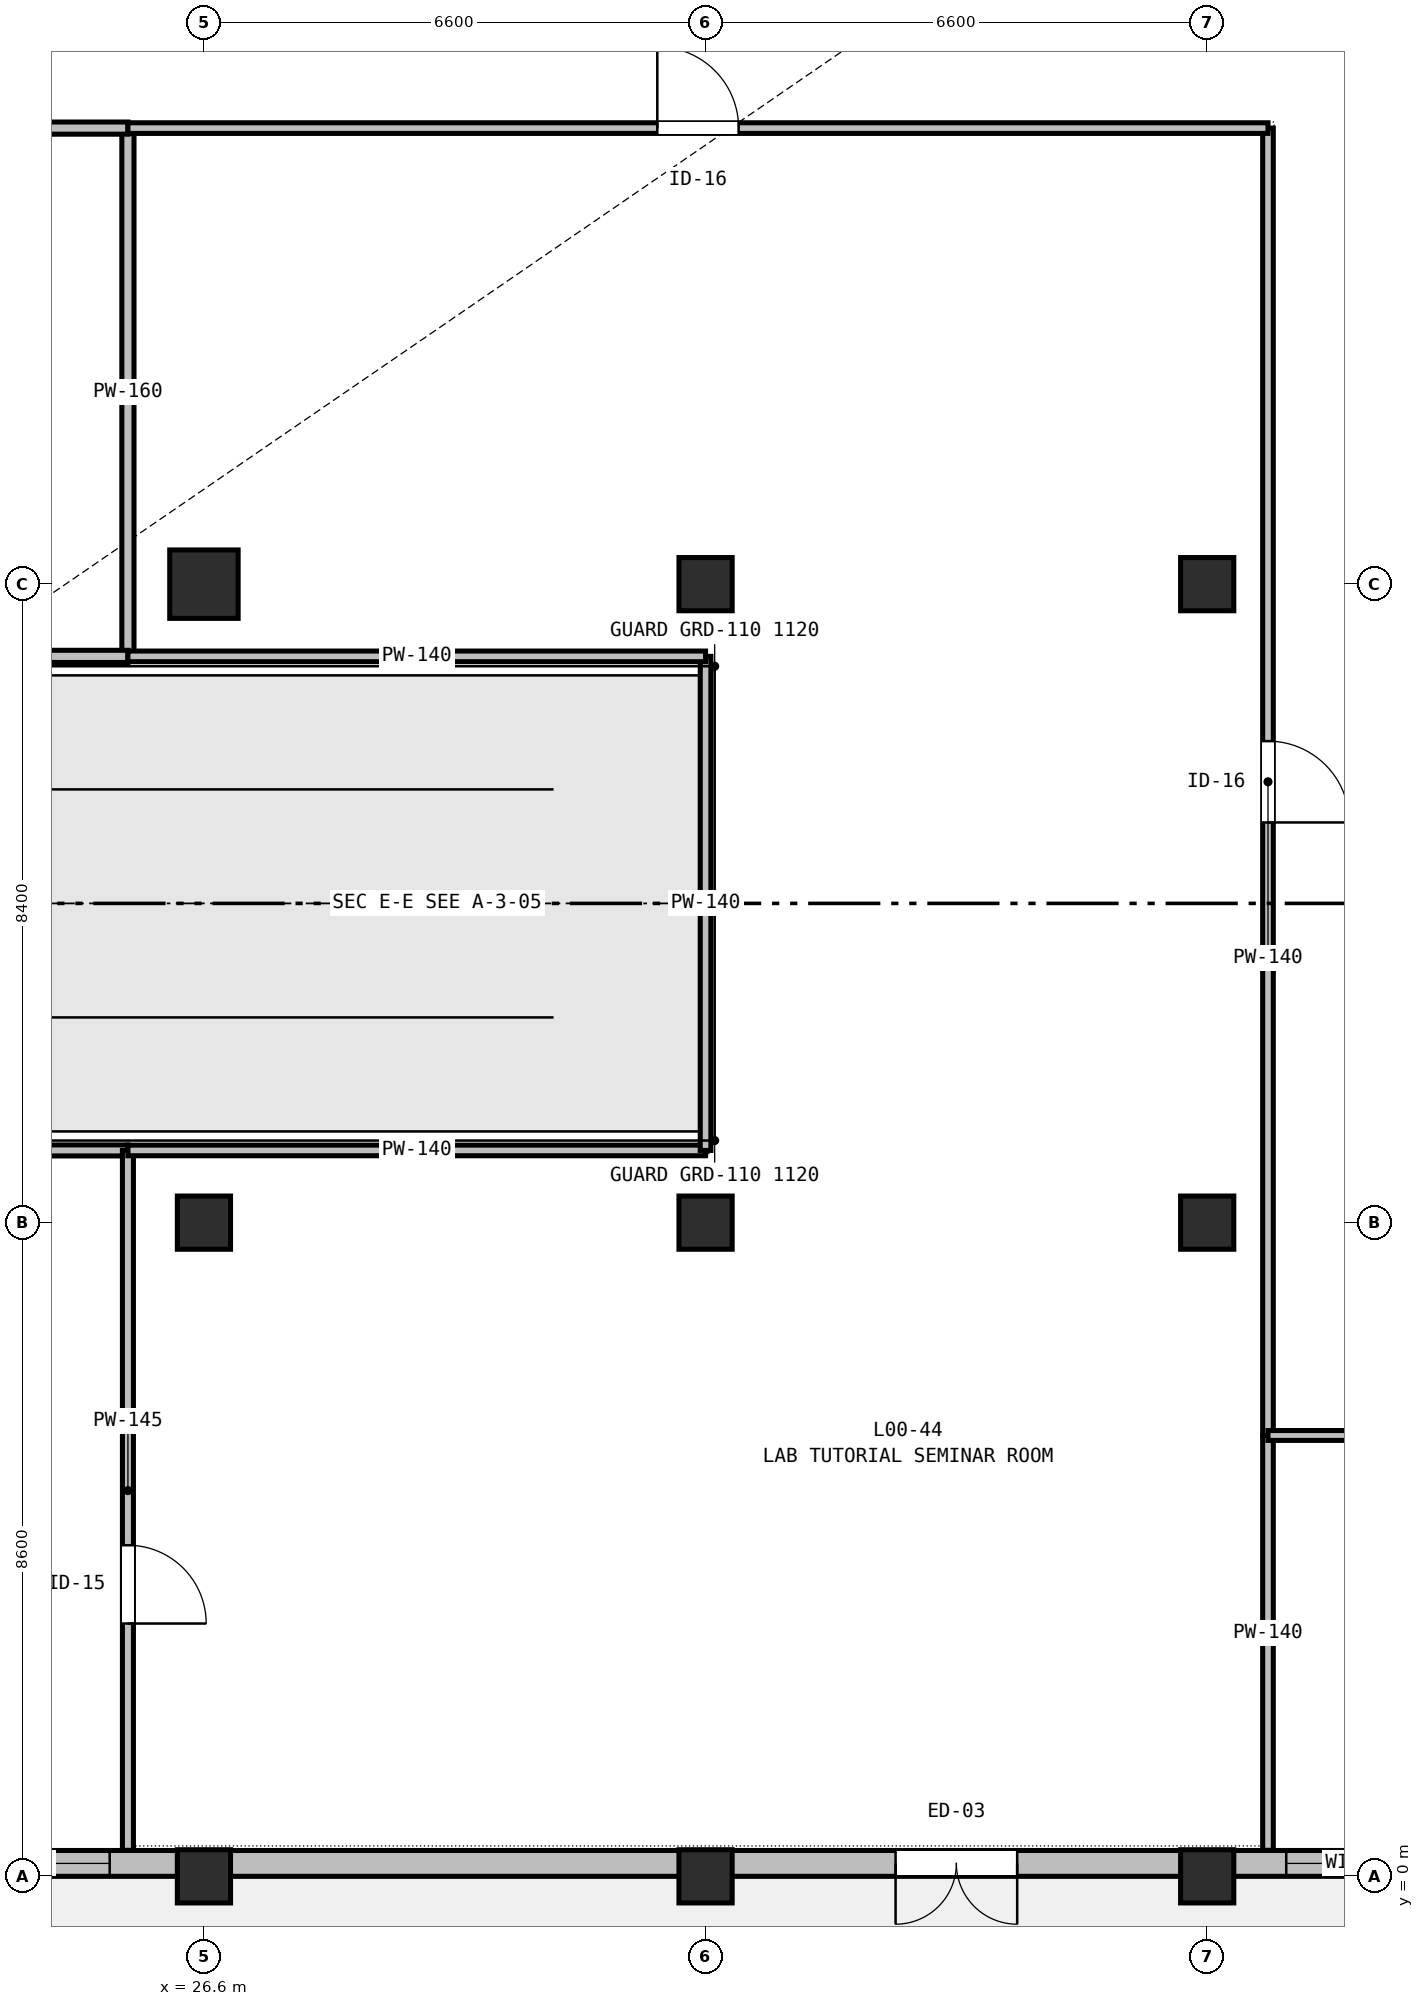
"""IFC4 building model, lengths in metres.
Left out: names, types, materials, properties, quantities, classifications, styles, units other than length and angle.
Written with IfcOpenShell. Run it as: python <this file> out.ifc"""

import sys

from ifc_helpers import new_model, si_unit, direction, frame, frame_2d, origin, origin_2d, place, context, subcontext, project, spatial, rectangle, extrude, element, fill, save


model = new_model("IFC4")
c1 = context("Model", 3, precision=1e-05, world=origin(), true_north=direction((0.0, 1.0)))
c2 = subcontext(c1, "Body", "Model", "MODEL_VIEW")
j1 = project(units=[si_unit("LENGTHUNIT", "METRE"), si_unit("PLANEANGLEUNIT", "RADIAN")], contexts=[c1])
p1 = place(None, origin())
s1 = spatial("IfcSite", under=j1, at=p1, CompositionType="ELEMENT")
p2 = place(p1, origin())
s2 = spatial("IfcBuilding", under=s1, at=p2, CompositionType="ELEMENT")
p3 = place(p2, origin())
s3 = spatial("IfcBuildingStorey", under=s2, at=p3, CompositionType="ELEMENT", Elevation=0.0)
p4 = place(p3, frame((26.6, 0.0, -0.32), z_axis=(0.0, 0.0, 1.0), x_axis=(1.0, 0.0, 0.0)))
e1 = element("IfcColumn", 1, at=p4, inside=s3, PredefinedType="COLUMN", context=c2, shape_type="SweptSolid", body=[
    extrude(rectangle(XDim=0.7, YDim=0.7, at=origin_2d()), origin(), (0.0, 0.0, 1.0), 5.66),
])
p5 = place(p3, frame((26.6, 8.6, -0.32), z_axis=(0.0, 0.0, 1.0), x_axis=(1.0, 0.0, 0.0)))
e2 = element("IfcColumn", 2, at=p5, inside=s3, PredefinedType="COLUMN", context=c2, shape_type="SweptSolid", body=[
    extrude(rectangle(XDim=0.7, YDim=0.7, at=origin_2d()), origin(), (0.0, 0.0, 1.0), 5.72),
])
p6 = place(p3, frame((26.6, 17.0, -0.32), z_axis=(0.0, 0.0, 1.0), x_axis=(1.0, 0.0, 0.0)))
e3 = element("IfcColumn", 3, at=p6, inside=s3, PredefinedType="COLUMN", context=c2, shape_type="SweptSolid", body=[
    extrude(rectangle(XDim=0.9, YDim=0.9, at=origin_2d()), origin(), (0.0, 0.0, 1.0), 5.72),
])
p7 = place(p3, frame((33.2, 0.0, -0.32), z_axis=(0.0, 0.0, 1.0), x_axis=(1.0, 0.0, 0.0)))
e4 = element("IfcColumn", 4, at=p7, inside=s3, PredefinedType="COLUMN", context=c2, shape_type="SweptSolid", body=[
    extrude(rectangle(XDim=0.7, YDim=0.7, at=origin_2d()), origin(), (0.0, 0.0, 1.0), 5.66),
])
for number, where, z_axis, x_axis in (
    (5, (33.2, 8.6, 0.0), (0.0, 0.0, 1.0), (1.0, 0.0, 0.0)),
    (6, (33.2, 17.0, 0.0), (0.0, 0.0, 1.0), (1.0, 0.0, 0.0)),
):
    element("IfcColumn", number, at=place(p3, frame(where, z_axis=z_axis, x_axis=x_axis)), inside=s3, PredefinedType="COLUMN", context=c2, shape_type="SweptSolid", body=[
        extrude(rectangle(XDim=0.7, YDim=0.7, at=origin_2d()), origin(), (0.0, 0.0, 1.0), 5.4),
    ])
p8 = place(p3, frame((39.8, 0.0, -0.32), z_axis=(0.0, 0.0, 1.0), x_axis=(1.0, 0.0, 0.0)))
e7 = element("IfcColumn", 7, at=p8, inside=s3, PredefinedType="COLUMN", context=c2, shape_type="SweptSolid", body=[
    extrude(rectangle(XDim=0.7, YDim=0.7, at=origin_2d()), origin(), (0.0, 0.0, 1.0), 5.66),
])
for number, where, z_axis, x_axis in (
    (8, (39.8, 8.6, 0.0), (0.0, 0.0, 1.0), (1.0, 0.0, 0.0)),
    (9, (39.8, 17.0, 0.0), (0.0, 0.0, 1.0), (1.0, 0.0, 0.0)),
):
    element("IfcColumn", number, at=place(p3, frame(where, z_axis=z_axis, x_axis=x_axis)), inside=s3, PredefinedType="COLUMN", context=c2, shape_type="SweptSolid", body=[
        extrude(rectangle(XDim=0.7, YDim=0.7, at=origin_2d()), origin(), (0.0, 0.0, 1.0), 5.4),
    ])
p9 = place(p3, frame((46.4, 0.17, 0.0), z_axis=(0.0, 0.0, 1.0), x_axis=(-1.0, 0.0, 0.0)))
e10 = element("IfcWall", 10, at=p9, inside=s3, PredefinedType="STANDARD", context=c2, shape_type="SweptSolid", body=[
    extrude(rectangle(XDim=6.6, YDim=0.34, at=frame_2d((3.3, 0.0))), origin(), (0.0, 0.0, 1.0), 4.535),
])
p10 = place(p9, frame((0.807, 0.0, 0.9)))
e11 = element("IfcOpeningElement", 11, at=p10, cuts=e10, PredefinedType="OPENING", context=c2, shape_type="SweptSolid", body=[
    extrude(rectangle(XDim=1.95, YDim=2.1, at=frame_2d((0.975, 1.05))), frame((0.0, 0.18, 0.0), z_axis=(0.0, -1.0, 0.0), x_axis=(1.0, 0.0, 0.0)), (0.0, 0.0, 1.0), 0.36),
])
p11 = place(p9, frame((3.61, 0.0, 0.9)))
e12 = element("IfcOpeningElement", 12, at=p11, cuts=e10, PredefinedType="OPENING", context=c2, shape_type="SweptSolid", body=[
    extrude(rectangle(XDim=1.95, YDim=2.1, at=frame_2d((0.975, 1.05))), frame((0.0, 0.18, 0.0), z_axis=(0.0, -1.0, 0.0), x_axis=(1.0, 0.0, 0.0)), (0.0, 0.0, 1.0), 0.36),
])
p12 = place(p3, frame((39.8, 0.17, 0.0), z_axis=(0.0, 0.0, 1.0), x_axis=(-1.0, 0.0, 0.0)))
e13 = element("IfcWall", 13, at=p12, inside=s3, PredefinedType="STANDARD", context=c2, shape_type="SweptSolid", body=[
    extrude(rectangle(XDim=6.6, YDim=0.34, at=frame_2d((3.3, 0.0))), origin(), (0.0, 0.0, 1.0), 4.535),
])
p13 = place(p12, frame((2.5, 0.0, 0.0)))
e14 = element("IfcOpeningElement", 14, at=p13, cuts=e13, PredefinedType="OPENING", context=c2, shape_type="SweptSolid", body=[
    extrude(rectangle(XDim=1.6, YDim=2.2, at=frame_2d((0.8, 1.1))), frame((0.0, 0.18, 0.0), z_axis=(0.0, -1.0, 0.0), x_axis=(1.0, 0.0, 0.0)), (0.0, 0.0, 1.0), 0.36),
])
p14 = place(p3, frame((33.2, 0.17, 0.0), z_axis=(0.0, 0.0, 1.0), x_axis=(-1.0, 0.0, 0.0)))
e15 = element("IfcWall", 15, at=p14, inside=s3, PredefinedType="STANDARD", context=c2, shape_type="SweptSolid", body=[
    extrude(rectangle(XDim=6.6, YDim=0.34, at=frame_2d((3.3, 0.0))), origin(), (0.0, 0.0, 1.0), 4.535),
])
p15 = place(p3, frame((26.6, 0.17, 0.0), z_axis=(0.0, 0.0, 1.0), x_axis=(-1.0, 0.0, 0.0)))
e16 = element("IfcWall", 16, at=p15, inside=s3, PredefinedType="STANDARD", context=c2, shape_type="SweptSolid", body=[
    extrude(rectangle(XDim=6.6, YDim=0.34, at=frame_2d((3.3, 0.0))), origin(), (0.0, 0.0, 1.0), 4.535),
])
p16 = place(p15, frame((1.24, 0.0, 0.9)))
e17 = element("IfcOpeningElement", 17, at=p16, cuts=e16, PredefinedType="OPENING", context=c2, shape_type="SweptSolid", body=[
    extrude(rectangle(XDim=2.4, YDim=2.1, at=frame_2d((1.2, 1.05))), frame((0.0, 0.18, 0.0), z_axis=(0.0, -1.0, 0.0), x_axis=(1.0, 0.0, 0.0)), (0.0, 0.0, 1.0), 0.36),
])
p17 = place(p3, frame((25.6, 23.0, 0.0), z_axis=(0.0, 0.0, 1.0), x_axis=(0.0, -1.0, 0.0)))
e18 = element("IfcWall", 18, at=p17, inside=s3, PredefinedType="PARTITIONING", context=c2, shape_type="SweptSolid", body=[
    extrude(rectangle(XDim=6.95, YDim=0.16, at=frame_2d((3.475, 0.0))), origin(), (0.0, 0.0, 1.0), 4.435),
])
p18 = place(p3, frame((25.6, 16.05, 0.0), z_axis=(0.0, 0.0, 1.0), x_axis=(-1.0, 0.0, 0.0)))
e19 = element("IfcWall", 19, at=p18, inside=s3, PredefinedType="PARTITIONING", context=c2, shape_type="SweptSolid", body=[
    extrude(rectangle(XDim=12.0, YDim=0.16, at=frame_2d((6.0, 0.0))), origin(), (0.0, 0.0, 1.0), 4.535),
])
p19 = place(p3, frame((13.6, 23.0, 0.0), z_axis=(0.0, 0.0, 1.0), x_axis=(1.0, 0.0, 0.0)))
e20 = element("IfcWall", 20, at=p19, inside=s3, PredefinedType="PARTITIONING", context=c2, shape_type="SweptSolid", body=[
    extrude(rectangle(XDim=12.0, YDim=0.16, at=frame_2d((6.0, 0.0))), origin(), (0.0, 0.0, 1.0), 4.535),
])
p20 = place(p19, frame((5.515, 0.0, 0.0)))
e21 = element("IfcOpeningElement", 21, at=p20, cuts=e20, PredefinedType="OPENING", context=c2, shape_type="SweptSolid", body=[
    extrude(rectangle(XDim=0.97, YDim=2.1, at=frame_2d((0.485, 1.05))), frame((0.0, 0.09, 0.0), z_axis=(0.0, -1.0, 0.0), x_axis=(1.0, 0.0, 0.0)), (0.0, 0.0, 1.0), 0.18),
])
p21 = place(p3, frame((13.6, 9.55, 0.0), z_axis=(0.0, 0.0, 1.0), x_axis=(1.0, 0.0, 0.0)))
e22 = element("IfcWall", 22, at=p21, inside=s3, PredefinedType="PARTITIONING", context=c2, shape_type="SweptSolid", body=[
    extrude(rectangle(XDim=12.0, YDim=0.145, at=frame_2d((6.0, 0.0))), origin(), (0.0, 0.0, 1.0), 4.535),
])
p22 = place(p3, frame((25.6, 9.55, 0.0), z_axis=(0.0, 0.0, 1.0), x_axis=(0.0, -1.0, 0.0)))
e23 = element("IfcWall", 23, at=p22, inside=s3, PredefinedType="PARTITIONING", context=c2, shape_type="SweptSolid", body=[
    extrude(rectangle(XDim=9.208, YDim=0.145, at=frame_2d((4.604, 0.0))), origin(), (0.0, 0.0, 1.0), 4.735),
])
p23 = place(p22, frame((5.194, 0.0, 0.0)))
e24 = element("IfcOpeningElement", 24, at=p23, cuts=e23, PredefinedType="OPENING", context=c2, shape_type="SweptSolid", body=[
    extrude(rectangle(XDim=1.03, YDim=2.1, at=frame_2d((0.515, 1.05))), frame((0.0, 0.083, 0.0), z_axis=(0.0, -1.0, 0.0), x_axis=(1.0, 0.0, 0.0)), (0.0, 0.0, 1.0), 0.165),
])
p24 = place(p3, frame((40.6, 23.0, 0.0), z_axis=(0.0, 0.0, 1.0), x_axis=(0.0, -1.0, 0.0)))
e25 = element("IfcWall", 25, at=p24, inside=s3, PredefinedType="PARTITIONING", context=c2, shape_type="SweptSolid", body=[
    extrude(rectangle(XDim=17.2, YDim=0.14, at=frame_2d((8.6, 0.0))), origin(), (0.0, 0.0, 1.0), 4.735),
])
p25 = place(p24, frame((8.065, 0.0, 0.0)))
e26 = element("IfcOpeningElement", 26, at=p25, cuts=e25, PredefinedType="OPENING", context=c2, shape_type="SweptSolid", body=[
    extrude(rectangle(XDim=1.07, YDim=2.1, at=frame_2d((0.535, 1.05))), frame((0.0, 0.08, 0.0), z_axis=(0.0, -1.0, 0.0), x_axis=(1.0, 0.0, 0.0)), (0.0, 0.0, 1.0), 0.16),
])
p26 = place(p3, frame((40.6, 5.8, 0.0), z_axis=(0.0, 0.0, 1.0), x_axis=(0.0, -1.0, 0.0)))
e27 = element("IfcWall", 27, at=p26, inside=s3, PredefinedType="PARTITIONING", context=c2, shape_type="SweptSolid", body=[
    extrude(rectangle(XDim=5.458, YDim=0.14, at=frame_2d((2.729, 0.0))), origin(), (0.0, 0.0, 1.0), 5.095),
])
p27 = place(p3, frame((25.6, 9.55, 0.0), z_axis=(0.0, 0.0, 1.0), x_axis=(1.0, 0.0, 0.0)))
e28 = element("IfcWall", 28, at=p27, inside=s3, PredefinedType="PARTITIONING", context=c2, shape_type="SweptSolid", body=[
    extrude(rectangle(XDim=7.6, YDim=0.14, at=frame_2d((3.8, 0.0))), origin(), (0.0, 0.0, 1.0), 4.535),
])
p28 = place(p3, frame((33.2, 9.55, 0.0), z_axis=(0.0, 0.0, 1.0), x_axis=(0.0, 1.0, 0.0)))
e29 = element("IfcWall", 29, at=p28, inside=s3, PredefinedType="PARTITIONING", context=c2, shape_type="SweptSolid", body=[
    extrude(rectangle(XDim=6.5, YDim=0.14, at=frame_2d((3.25, 0.0))), origin(), (0.0, 0.0, 1.0), 4.535),
])
p29 = place(p3, frame((33.2, 16.05, 0.0), z_axis=(0.0, 0.0, 1.0), x_axis=(-1.0, 0.0, 0.0)))
e30 = element("IfcWall", 30, at=p29, inside=s3, PredefinedType="PARTITIONING", context=c2, shape_type="SweptSolid", body=[
    extrude(rectangle(XDim=7.6, YDim=0.14, at=frame_2d((3.8, 0.0))), origin(), (0.0, 0.0, 1.0), 4.535),
])
p30 = place(p3, frame((25.6, 23.0, 0.0), z_axis=(0.0, 0.0, 1.0), x_axis=(1.0, 0.0, 0.0)))
e31 = element("IfcWall", 31, at=p30, inside=s3, PredefinedType="PARTITIONING", context=c2, shape_type="SweptSolid", body=[
    extrude(rectangle(XDim=15.0, YDim=0.14, at=frame_2d((7.5, 0.0))), origin(), (0.0, 0.0, 1.0), 4.535),
])
p31 = place(p30, frame((6.965, 0.0, 0.0)))
e32 = element("IfcOpeningElement", 32, at=p31, cuts=e31, PredefinedType="OPENING", context=c2, shape_type="SweptSolid", body=[
    extrude(rectangle(XDim=1.07, YDim=2.1, at=frame_2d((0.535, 1.05))), frame((0.0, 0.08, 0.0), z_axis=(0.0, -1.0, 0.0), x_axis=(1.0, 0.0, 0.0)), (0.0, 0.0, 1.0), 0.16),
])
p32 = place(p3, frame((40.6, 5.8, 0.0), z_axis=(0.0, 0.0, 1.0), x_axis=(1.0, 0.0, 0.0)))
e33 = element("IfcWall", 33, at=p32, inside=s3, PredefinedType="PARTITIONING", context=c2, shape_type="SweptSolid", body=[
    extrude(rectangle(XDim=5.8, YDim=0.13, at=frame_2d((2.9, 0.0))), origin(), (0.0, 0.0, 1.0), 4.535),
])
p33 = place(p32, frame((2.34, 0.0, 0.0)))
e34 = element("IfcOpeningElement", 34, at=p33, cuts=e33, PredefinedType="OPENING", context=c2, shape_type="SweptSolid", body=[
    extrude(rectangle(XDim=1.12, YDim=2.1, at=frame_2d((0.56, 1.05))), frame((0.0, 0.075, 0.0), z_axis=(0.0, -1.0, 0.0), x_axis=(1.0, 0.0, 0.0)), (0.0, 0.0, 1.0), 0.15),
])
p34 = place(p13, origin())
e35 = element("IfcDoor", 35, at=p34, inside=s3, OperationType="DOUBLE_DOOR_SINGLE_SWING", PredefinedType="DOOR", context=c2, shape_type="SweptSolid", body=[
    extrude(rectangle(XDim=1.6, YDim=2.2, at=frame_2d((0.8, 1.1))), frame((0.0, 0.025, 0.0), z_axis=(0.0, -1.0, 0.0), x_axis=(1.0, 0.0, 0.0)), (0.0, 0.0, 1.0), 0.05),
])
fill(e14, e35)
p35 = place(p11, origin())
e36 = element("IfcWindow", 36, at=p35, inside=s3, PartitioningType="SINGLE_PANEL", PredefinedType="WINDOW", context=c2, shape_type="SweptSolid", body=[
    extrude(rectangle(XDim=1.95, YDim=2.1, at=frame_2d((0.975, 1.05))), frame((0.0, 0.03, 0.0), z_axis=(0.0, -1.0, 0.0), x_axis=(1.0, 0.0, 0.0)), (0.0, 0.0, 1.0), 0.06),
])
fill(e12, e36)
p36 = place(p16, origin())
e37 = element("IfcWindow", 37, at=p36, inside=s3, PartitioningType="SINGLE_PANEL", PredefinedType="WINDOW", context=c2, shape_type="SweptSolid", body=[
    extrude(rectangle(XDim=2.4, YDim=2.1, at=frame_2d((1.2, 1.05))), frame((0.0, 0.03, 0.0), z_axis=(0.0, -1.0, 0.0), x_axis=(1.0, 0.0, 0.0)), (0.0, 0.0, 1.0), 0.06),
])
fill(e17, e37)
p37 = place(p23, origin())
e38 = element("IfcDoor", 38, at=p37, inside=s3, OperationType="SINGLE_SWING_RIGHT", PredefinedType="DOOR", context=c2, shape_type="SweptSolid", body=[
    extrude(rectangle(XDim=1.03, YDim=2.1, at=frame_2d((0.515, 1.05))), frame((0.0, 0.025, 0.0), z_axis=(0.0, -1.0, 0.0), x_axis=(1.0, 0.0, 0.0)), (0.0, 0.0, 1.0), 0.05),
])
fill(e24, e38)
p38 = place(p25, origin())
e39 = element("IfcDoor", 39, at=p38, inside=s3, OperationType="SINGLE_SWING_RIGHT", PredefinedType="DOOR", context=c2, shape_type="SweptSolid", body=[
    extrude(rectangle(XDim=1.07, YDim=2.1, at=frame_2d((0.535, 1.05))), frame((0.0, 0.025, 0.0), z_axis=(0.0, -1.0, 0.0), x_axis=(1.0, 0.0, 0.0)), (0.0, 0.0, 1.0), 0.05),
])
fill(e26, e39)
p39 = place(p31, origin())
e40 = element("IfcDoor", 40, at=p39, inside=s3, OperationType="SINGLE_SWING_LEFT", PredefinedType="DOOR", context=c2, shape_type="SweptSolid", body=[
    extrude(rectangle(XDim=1.07, YDim=2.1, at=frame_2d((0.535, 1.05))), frame((0.0, 0.025, 0.0), z_axis=(0.0, -1.0, 0.0), x_axis=(1.0, 0.0, 0.0)), (0.0, 0.0, 1.0), 0.05),
])
fill(e32, e40)
save(model, sys.argv[1])
